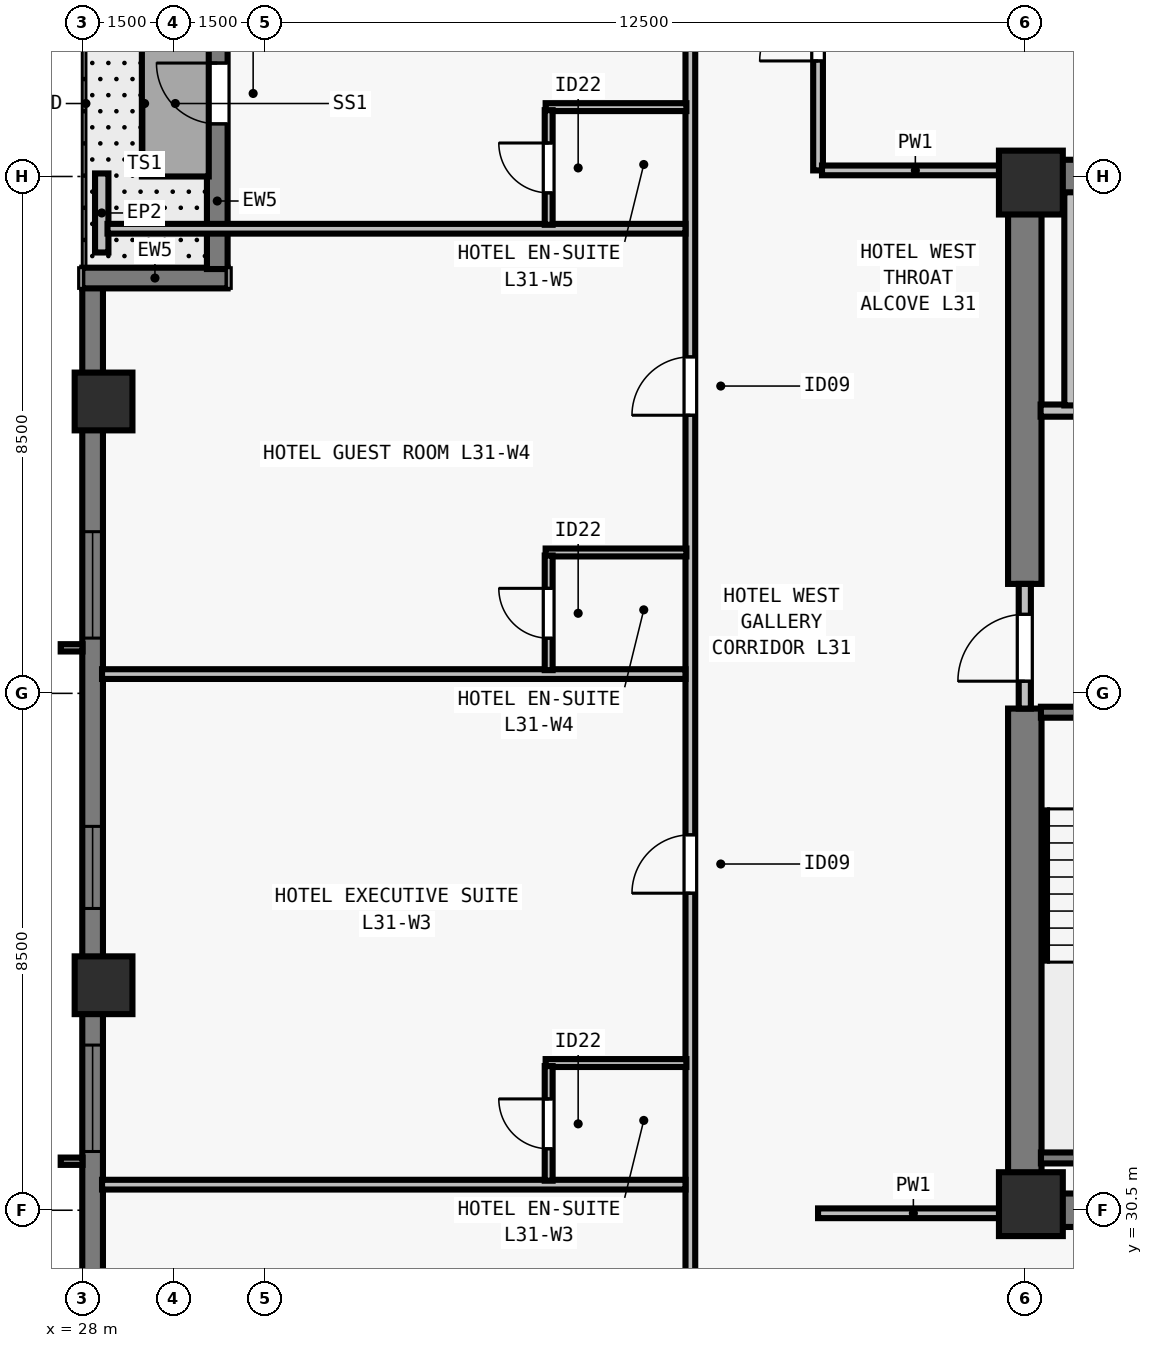
"""IFC4 building model, lengths in metres.
Left out: names, types, materials, properties, quantities, classifications, styles, units other than length and angle.
Written with IfcOpenShell. Run it as: python <this file> out.ifc"""

import sys

from ifc_helpers import new_model, si_unit, direction, frame, frame_2d, origin, origin_2d, place, context, subcontext, project, spatial, rectangle, extrude, element, fill, save


model = new_model("IFC4")
c1 = context("Model", 3, precision=1e-05, world=origin(), true_north=direction((0.0, 1.0)))
c2 = subcontext(c1, "Body", "Model", "MODEL_VIEW")
j1 = project(units=[si_unit("LENGTHUNIT", "METRE"), si_unit("PLANEANGLEUNIT", "RADIAN")], contexts=[c1])
p1 = place(None, origin())
s1 = spatial("IfcSite", under=j1, at=p1, CompositionType="ELEMENT")
p2 = place(p1, origin())
s2 = spatial("IfcBuilding", under=s1, at=p2, CompositionType="ELEMENT")
p3 = place(p2, frame((0.0, 0.0, 116.5)))
s3 = spatial("IfcBuildingStorey", under=s2, at=p3, CompositionType="ELEMENT", Elevation=116.5)
for number, where, z_axis, x_axis in (
    (1, (43.6, 30.6, 0.0), (0.0, 0.0, 1.0), (1.0, 0.0, 0.0)),
    (2, (43.6, 47.4, 0.0), (0.0, 0.0, 1.0), (1.0, 0.0, 0.0)),
):
    element("IfcColumn", number, at=place(p3, frame(where, z_axis=z_axis, x_axis=x_axis)), inside=s3, PredefinedType="COLUMN", context=c2, shape_type="SweptSolid", body=[
        extrude(rectangle(XDim=1.05, YDim=1.05, at=origin_2d()), origin(), (0.0, 0.0, 1.0), 3.5),
    ])
for number, where, z_axis, x_axis in (
    (3, (28.35, 43.8, 0.0), (0.0, 0.0, 1.0), (0.0, 1.0, 0.0)),
    (4, (28.35, 34.2, 0.0), (0.0, 0.0, 1.0), (0.0, 1.0, 0.0)),
):
    element("IfcColumn", number, at=place(p3, frame(where, z_axis=z_axis, x_axis=x_axis)), inside=s3, PredefinedType="COLUMN", context=c2, shape_type="SweptSolid", body=[
        extrude(rectangle(XDim=0.95, YDim=0.95, at=origin_2d()), origin(), (0.0, 0.0, 1.0), 3.5),
    ])
p4 = place(p3, frame((28.17, 19.0, 0.0), z_axis=(0.0, 0.0, 1.0), x_axis=(0.0, 1.0, 0.0)))
e5 = element("IfcWall", 5, at=p4, inside=s3, PredefinedType="SOLIDWALL", context=c2, shape_type="SweptSolid", body=[
    extrude(rectangle(XDim=26.682, YDim=0.34, at=frame_2d((13.341, 0.0))), origin(), (0.0, 0.0, 1.0), 3.28),
])
p5 = place(p4, frame((5.323, 0.0, 0.8)))
e6 = element("IfcOpeningElement", 6, at=p5, cuts=e5, PredefinedType="OPENING", context=c2, shape_type="SweptSolid", body=[
    extrude(rectangle(XDim=1.75, YDim=1.66, at=frame_2d((0.875, 0.83))), frame((0.0, 0.18, 0.0), z_axis=(0.0, -1.0, 0.0), x_axis=(1.0, 0.0, 0.0)), (0.0, 0.0, 1.0), 0.36),
])
p6 = place(p4, frame((8.87, 0.0, 0.8)))
e7 = element("IfcOpeningElement", 7, at=p6, cuts=e5, PredefinedType="OPENING", context=c2, shape_type="SweptSolid", body=[
    extrude(rectangle(XDim=1.35, YDim=1.66, at=frame_2d((0.675, 0.83))), frame((0.0, 0.18, 0.0), z_axis=(0.0, -1.0, 0.0), x_axis=(1.0, 0.0, 0.0)), (0.0, 0.0, 1.0), 0.36),
])
p7 = place(p4, frame((12.466, 0.0, 0.8)))
e8 = element("IfcOpeningElement", 8, at=p7, cuts=e5, PredefinedType="OPENING", context=c2, shape_type="SweptSolid", body=[
    extrude(rectangle(XDim=1.75, YDim=1.66, at=frame_2d((0.875, 0.83))), frame((0.0, 0.18, 0.0), z_axis=(0.0, -1.0, 0.0), x_axis=(1.0, 0.0, 0.0)), (0.0, 0.0, 1.0), 0.36),
])
p8 = place(p4, frame((16.462, 0.0, 0.8)))
e9 = element("IfcOpeningElement", 9, at=p8, cuts=e5, PredefinedType="OPENING", context=c2, shape_type="SweptSolid", body=[
    extrude(rectangle(XDim=1.35, YDim=1.66, at=frame_2d((0.675, 0.83))), frame((0.0, 0.18, 0.0), z_axis=(0.0, -1.0, 0.0), x_axis=(1.0, 0.0, 0.0)), (0.0, 0.0, 1.0), 0.36),
])
p9 = place(p4, frame((20.909, 0.0, 0.8)))
e10 = element("IfcOpeningElement", 10, at=p9, cuts=e5, PredefinedType="OPENING", context=c2, shape_type="SweptSolid", body=[
    extrude(rectangle(XDim=1.75, YDim=1.66, at=frame_2d((0.875, 0.83))), frame((0.0, 0.18, 0.0), z_axis=(0.0, -1.0, 0.0), x_axis=(1.0, 0.0, 0.0)), (0.0, 0.0, 1.0), 0.36),
])
p10 = place(p3, frame((28.0, 45.83, 0.0), z_axis=(0.0, 0.0, 1.0), x_axis=(1.0, 0.0, 0.0)))
e11 = element("IfcWall", 11, at=p10, inside=s3, PredefinedType="SOLIDWALL", context=c2, shape_type="SweptSolid", body=[
    extrude(rectangle(XDim=2.39, YDim=0.34, at=frame_2d((1.195, 0.0))), origin(), (0.0, 0.0, 1.0), 3.28),
])
p11 = place(p3, frame((30.22, 45.978, 0.0), z_axis=(0.0, 0.0, 1.0), x_axis=(0.0, 1.0, 0.0)))
e12 = element("IfcWall", 12, at=p11, inside=s3, PredefinedType="SOLIDWALL", context=c2, shape_type="SweptSolid", body=[
    extrude(rectangle(XDim=5.762, YDim=0.34, at=frame_2d((2.881, 0.0))), origin(), (0.0, 0.0, 1.0), 3.28),
])
p12 = place(p11, frame((2.387, 0.0, 0.0)))
e13 = element("IfcOpeningElement", 13, at=p12, cuts=e12, PredefinedType="OPENING", context=c2, shape_type="SweptSolid", body=[
    extrude(rectangle(XDim=1.0, YDim=2.15, at=frame_2d((0.5, 1.075))), frame((0.0, 0.18, 0.0), z_axis=(0.0, -1.0, 0.0), x_axis=(1.0, 0.0, 0.0)), (0.0, 0.0, 1.0), 0.36),
])
p13 = place(p3, frame((28.32, 46.25, 0.0), z_axis=(0.0, 0.0, 1.0), x_axis=(0.0, 1.0, 0.0)))
e14 = element("IfcWall", 14, at=p13, inside=s3, PredefinedType="PARAPET", context=c2, shape_type="SweptSolid", body=[
    extrude(rectangle(XDim=1.3, YDim=0.22, at=frame_2d((0.65, 0.0))), origin(), (0.0, 0.0, 1.0), 0.55),
])
for number, where, z_axis, x_axis in (
    (15, (43.225, 30.5, 0.0), (0.0, 0.0, 1.0), (1.0, 0.0, 0.0)),
    (16, (43.225, 47.5, 0.0), (0.0, 0.0, 1.0), (1.0, 0.0, 0.0)),
):
    element("IfcWall", number, at=place(p3, frame(where, z_axis=z_axis, x_axis=x_axis)), inside=s3, PredefinedType="SHEAR", context=c2, shape_type="SweptSolid", body=[
        extrude(rectangle(XDim=17.55, YDim=0.55, at=frame_2d((8.775, 0.0))), origin(), (0.0, 0.0, 1.0), 3.28),
    ])
p14 = place(p3, frame((43.5, 30.765, 0.0), z_axis=(0.0, 0.0, 1.0), x_axis=(0.0, 1.0, 0.0)))
e17 = element("IfcWall", 17, at=p14, inside=s3, PredefinedType="SHEAR", context=c2, shape_type="SweptSolid", body=[
    extrude(rectangle(XDim=7.985, YDim=0.55, at=frame_2d((3.993, 0.0))), origin(), (0.0, 0.0, 1.0), 3.28),
])
p15 = place(p3, frame((43.5, 40.8, 0.0), z_axis=(0.0, 0.0, 1.0), x_axis=(0.0, 1.0, 0.0)))
e18 = element("IfcWall", 18, at=p15, inside=s3, PredefinedType="SHEAR", context=c2, shape_type="SweptSolid", body=[
    extrude(rectangle(XDim=6.435, YDim=0.55, at=frame_2d((3.218, 0.0))), origin(), (0.0, 0.0, 1.0), 3.28),
])
p16 = place(p3, frame((43.5, 38.75, 0.0), z_axis=(0.0, 0.0, 1.0), x_axis=(0.0, 1.0, 0.0)))
e19 = element("IfcWall", 19, at=p16, inside=s3, PredefinedType="SOLIDWALL", context=c2, shape_type="SweptSolid", body=[
    extrude(rectangle(XDim=2.05, YDim=0.2, at=frame_2d((1.025, 0.0))), origin(), (0.0, 0.0, 1.0), 3.28),
])
p17 = place(p16, frame((0.45, 0.0, 0.0)))
e20 = element("IfcOpeningElement", 20, at=p17, cuts=e19, PredefinedType="OPENING", context=c2, shape_type="SweptSolid", body=[
    extrude(rectangle(XDim=1.1, YDim=2.15, at=frame_2d((0.55, 1.075))), frame((0.0, 0.11, 0.0), z_axis=(0.0, -1.0, 0.0), x_axis=(1.0, 0.0, 0.0)), (0.0, 0.0, 1.0), 0.22),
])
p18 = place(p3, frame((43.76, 43.65, 0.0), z_axis=(0.0, 0.0, 1.0), x_axis=(1.0, 0.0, 0.0)))
e21 = element("IfcWall", 21, at=p18, inside=s3, PredefinedType="SOLIDWALL", context=c2, shape_type="SweptSolid", body=[
    extrude(rectangle(XDim=3.505, YDim=0.2, at=frame_2d((1.752, 0.0))), origin(), (0.0, 0.0, 1.0), 3.28),
])
p19 = place(p18, frame((1.11, 0.0, 0.0)))
e22 = element("IfcOpeningElement", 22, at=p19, cuts=e21, PredefinedType="OPENING", context=c2, shape_type="SweptSolid", body=[
    extrude(rectangle(XDim=1.1, YDim=2.2, at=frame_2d((0.55, 1.1))), frame((0.0, 0.11, 0.0), z_axis=(0.0, -1.0, 0.0), x_axis=(1.0, 0.0, 0.0)), (0.0, 0.0, 1.0), 0.22),
])
p20 = place(p3, frame((44.25, 43.735, 0.0), z_axis=(0.0, 0.0, 1.0), x_axis=(0.0, 1.0, 0.0)))
e23 = element("IfcWall", 23, at=p20, inside=s3, PredefinedType="SOLIDWALL", context=c2, shape_type="SweptSolid", body=[
    extrude(rectangle(XDim=3.505, YDim=0.2, at=frame_2d((1.752, 0.0))), origin(), (0.0, 0.0, 1.0), 3.28),
])
p21 = place(p3, frame((38.0, 15.325, 0.0), z_axis=(0.0, 0.0, 1.0), x_axis=(0.0, 1.0, 0.0)))
e24 = element("IfcWall", 24, at=p21, inside=s3, PredefinedType="PARTITIONING", context=c2, shape_type="SweptSolid", body=[
    extrude(rectangle(XDim=47.35, YDim=0.16, at=frame_2d((23.675, 0.0))), origin(), (0.0, 0.0, 1.0), 2.555),
])
p22 = place(p21, frame((5.003, 0.0, 0.0)))
e25 = element("IfcOpeningElement", 25, at=p22, cuts=e24, PredefinedType="OPENING", context=c2, shape_type="SweptSolid", body=[
    extrude(rectangle(XDim=0.96, YDim=2.15, at=frame_2d((0.48, 1.075))), frame((0.0, 0.09, 0.0), z_axis=(0.0, -1.0, 0.0), x_axis=(1.0, 0.0, 0.0)), (0.0, 0.0, 1.0), 0.18),
])
p23 = place(p21, frame((12.529, 0.0, 0.0)))
e26 = element("IfcOpeningElement", 26, at=p23, cuts=e24, PredefinedType="OPENING", context=c2, shape_type="SweptSolid", body=[
    extrude(rectangle(XDim=0.96, YDim=2.15, at=frame_2d((0.48, 1.075))), frame((0.0, 0.09, 0.0), z_axis=(0.0, -1.0, 0.0), x_axis=(1.0, 0.0, 0.0)), (0.0, 0.0, 1.0), 0.18),
])
p24 = place(p21, frame((20.389, 0.0, 0.0)))
e27 = element("IfcOpeningElement", 27, at=p24, cuts=e24, PredefinedType="OPENING", context=c2, shape_type="SweptSolid", body=[
    extrude(rectangle(XDim=0.96, YDim=2.15, at=frame_2d((0.48, 1.075))), frame((0.0, 0.09, 0.0), z_axis=(0.0, -1.0, 0.0), x_axis=(1.0, 0.0, 0.0)), (0.0, 0.0, 1.0), 0.18),
])
p25 = place(p21, frame((28.249, 0.0, 0.0)))
e28 = element("IfcOpeningElement", 28, at=p25, cuts=e24, PredefinedType="OPENING", context=c2, shape_type="SweptSolid", body=[
    extrude(rectangle(XDim=0.96, YDim=2.15, at=frame_2d((0.48, 1.075))), frame((0.0, 0.09, 0.0), z_axis=(0.0, -1.0, 0.0), x_axis=(1.0, 0.0, 0.0)), (0.0, 0.0, 1.0), 0.18),
])
p26 = place(p21, frame((36.109, 0.0, 0.0)))
e29 = element("IfcOpeningElement", 29, at=p26, cuts=e24, PredefinedType="OPENING", context=c2, shape_type="SweptSolid", body=[
    extrude(rectangle(XDim=0.96, YDim=2.15, at=frame_2d((0.48, 1.075))), frame((0.0, 0.09, 0.0), z_axis=(0.0, -1.0, 0.0), x_axis=(1.0, 0.0, 0.0)), (0.0, 0.0, 1.0), 0.18),
])
p27 = place(p21, frame((44.079, 0.0, 0.0)))
e30 = element("IfcOpeningElement", 30, at=p27, cuts=e24, PredefinedType="OPENING", context=c2, shape_type="SweptSolid", body=[
    extrude(rectangle(XDim=0.96, YDim=2.15, at=frame_2d((0.48, 1.075))), frame((0.0, 0.09, 0.0), z_axis=(0.0, -1.0, 0.0), x_axis=(1.0, 0.0, 0.0)), (0.0, 0.0, 1.0), 0.18),
])
p28 = place(p3, frame((40.1, 47.6, 0.0), z_axis=(0.0, 0.0, 1.0), x_axis=(0.0, 1.0, 0.0)))
e31 = element("IfcWall", 31, at=p28, inside=s3, PredefinedType="PARTITIONING", context=c2, shape_type="SweptSolid", body=[
    extrude(rectangle(XDim=15.075, YDim=0.16, at=frame_2d((7.538, 0.0))), origin(), (0.0, 0.0, 1.0), 2.555),
])
p29 = place(p28, frame((1.8, 0.0, 0.0)))
e32 = element("IfcOpeningElement", 32, at=p29, cuts=e31, PredefinedType="OPENING", context=c2, shape_type="SweptSolid", body=[
    extrude(rectangle(XDim=0.96, YDim=2.12, at=frame_2d((0.48, 1.06))), frame((0.0, 0.09, 0.0), z_axis=(0.0, -1.0, 0.0), x_axis=(1.0, 0.0, 0.0)), (0.0, 0.0, 1.0), 0.18),
])
p30 = place(p3, frame((40.1, 30.45, 0.0), z_axis=(0.0, 0.0, 1.0), x_axis=(1.0, 0.0, 0.0)))
e33 = element("IfcWall", 33, at=p30, inside=s3, PredefinedType="PARTITIONING", context=c2, shape_type="SweptSolid", body=[
    extrude(rectangle(XDim=3.135, YDim=0.16, at=frame_2d((1.567, 0.0))), origin(), (0.0, 0.0, 1.0), 3.28),
])
p31 = place(p3, frame((40.165, 47.6, 0.0), z_axis=(0.0, 0.0, 1.0), x_axis=(1.0, 0.0, 0.0)))
e34 = element("IfcWall", 34, at=p31, inside=s3, PredefinedType="PARTITIONING", context=c2, shape_type="SweptSolid", body=[
    extrude(rectangle(XDim=3.07, YDim=0.16, at=frame_2d((1.535, 0.0))), origin(), (0.0, 0.0, 1.0), 3.28),
])
p32 = place(p3, frame((28.325, 30.921, 0.0), z_axis=(0.0, 0.0, 1.0), x_axis=(1.0, 0.0, 0.0)))
e35 = element("IfcWall", 35, at=p32, inside=s3, PredefinedType="PARTITIONING", context=c2, shape_type="SweptSolid", body=[
    extrude(rectangle(XDim=9.595, YDim=0.16, at=frame_2d((4.797, 0.0))), origin(), (0.0, 0.0, 1.0), 3.28),
])
p33 = place(p3, frame((35.62, 32.921, 0.0), z_axis=(0.0, 0.0, 1.0), x_axis=(1.0, 0.0, 0.0)))
e36 = element("IfcWall", 36, at=p33, inside=s3, PredefinedType="PLUMBINGWALL", context=c2, shape_type="SweptSolid", body=[
    extrude(rectangle(XDim=2.315, YDim=0.13, at=frame_2d((1.157, 0.0))), origin(), (0.0, 0.0, 1.0), 3.28),
])
p34 = place(p3, frame((35.67, 30.986, 0.0), z_axis=(0.0, 0.0, 1.0), x_axis=(0.0, 1.0, 0.0)))
e37 = element("IfcWall", 37, at=p34, inside=s3, PredefinedType="PLUMBINGWALL", context=c2, shape_type="SweptSolid", body=[
    extrude(rectangle(XDim=1.885, YDim=0.13, at=frame_2d((0.942, 0.0))), origin(), (0.0, 0.0, 1.0), 3.28),
])
p35 = place(p34, frame((0.525, 0.0, 0.0)))
e38 = element("IfcOpeningElement", 38, at=p35, cuts=e37, PredefinedType="OPENING", context=c2, shape_type="SweptSolid", body=[
    extrude(rectangle(XDim=0.82, YDim=2.1, at=frame_2d((0.41, 1.05))), frame((0.0, 0.075, 0.0), z_axis=(0.0, -1.0, 0.0), x_axis=(1.0, 0.0, 0.0)), (0.0, 0.0, 1.0), 0.15),
])
p36 = place(p3, frame((28.325, 39.317, 0.0), z_axis=(0.0, 0.0, 1.0), x_axis=(1.0, 0.0, 0.0)))
e39 = element("IfcWall", 39, at=p36, inside=s3, PredefinedType="PARTITIONING", context=c2, shape_type="SweptSolid", body=[
    extrude(rectangle(XDim=9.595, YDim=0.16, at=frame_2d((4.797, 0.0))), origin(), (0.0, 0.0, 1.0), 2.896),
])
p37 = place(p3, frame((35.62, 41.317, 0.0), z_axis=(0.0, 0.0, 1.0), x_axis=(1.0, 0.0, 0.0)))
e40 = element("IfcWall", 40, at=p37, inside=s3, PredefinedType="PLUMBINGWALL", context=c2, shape_type="SweptSolid", body=[
    extrude(rectangle(XDim=2.315, YDim=0.13, at=frame_2d((1.157, 0.0))), origin(), (0.0, 0.0, 1.0), 2.896),
])
p38 = place(p3, frame((35.67, 39.382, 0.0), z_axis=(0.0, 0.0, 1.0), x_axis=(0.0, 1.0, 0.0)))
e41 = element("IfcWall", 41, at=p38, inside=s3, PredefinedType="PLUMBINGWALL", context=c2, shape_type="SweptSolid", body=[
    extrude(rectangle(XDim=1.885, YDim=0.13, at=frame_2d((0.942, 0.0))), origin(), (0.0, 0.0, 1.0), 3.28),
])
p39 = place(p38, frame((0.525, 0.0, 0.0)))
e42 = element("IfcOpeningElement", 42, at=p39, cuts=e41, PredefinedType="OPENING", context=c2, shape_type="SweptSolid", body=[
    extrude(rectangle(XDim=0.82, YDim=2.1, at=frame_2d((0.41, 1.05))), frame((0.0, 0.075, 0.0), z_axis=(0.0, -1.0, 0.0), x_axis=(1.0, 0.0, 0.0)), (0.0, 0.0, 1.0), 0.15),
])
p40 = place(p3, frame((28.415, 46.641, 0.0), z_axis=(0.0, 0.0, 1.0), x_axis=(1.0, 0.0, 0.0)))
e43 = element("IfcWall", 43, at=p40, inside=s3, PredefinedType="PARTITIONING", context=c2, shape_type="SweptSolid", body=[
    extrude(rectangle(XDim=9.505, YDim=0.16, at=frame_2d((4.752, 0.0))), origin(), (0.0, 0.0, 1.0), 3.28),
])
p41 = place(p3, frame((35.62, 48.641, 0.0), z_axis=(0.0, 0.0, 1.0), x_axis=(1.0, 0.0, 0.0)))
e44 = element("IfcWall", 44, at=p41, inside=s3, PredefinedType="PLUMBINGWALL", context=c2, shape_type="SweptSolid", body=[
    extrude(rectangle(XDim=2.315, YDim=0.13, at=frame_2d((1.157, 0.0))), origin(), (0.0, 0.0, 1.0), 3.28),
])
p42 = place(p3, frame((35.67, 46.706, 0.0), z_axis=(0.0, 0.0, 1.0), x_axis=(0.0, 1.0, 0.0)))
e45 = element("IfcWall", 45, at=p42, inside=s3, PredefinedType="PLUMBINGWALL", context=c2, shape_type="SweptSolid", body=[
    extrude(rectangle(XDim=1.885, YDim=0.13, at=frame_2d((0.942, 0.0))), origin(), (0.0, 0.0, 1.0), 3.28),
])
p43 = place(p42, frame((0.525, 0.0, 0.0)))
e46 = element("IfcOpeningElement", 46, at=p43, cuts=e45, PredefinedType="OPENING", context=c2, shape_type="SweptSolid", body=[
    extrude(rectangle(XDim=0.82, YDim=2.1, at=frame_2d((0.41, 1.05))), frame((0.0, 0.075, 0.0), z_axis=(0.0, -1.0, 0.0), x_axis=(1.0, 0.0, 0.0)), (0.0, 0.0, 1.0), 0.15),
])
p44 = place(p3, frame((43.765, 38.69, 0.0), z_axis=(0.0, 0.0, 1.0), x_axis=(1.0, 0.0, 0.0)))
e47 = element("IfcWall", 47, at=p44, inside=s3, PredefinedType="SOLIDWALL", context=c2, shape_type="SweptSolid", body=[
    extrude(rectangle(XDim=3.23, YDim=0.18, at=frame_2d((1.615, 0.0))), origin(), (0.0, 0.0, 1.0), 3.28),
])
p45 = place(p44, frame((1.14, 0.0, 0.0)))
e48 = element("IfcOpeningElement", 48, at=p45, cuts=e47, PredefinedType="OPENING", context=c2, shape_type="SweptSolid", body=[
    extrude(rectangle(XDim=0.95, YDim=2.15, at=frame_2d((0.475, 1.075))), frame((0.0, 0.1, 0.0), z_axis=(0.0, -1.0, 0.0), x_axis=(1.0, 0.0, 0.0)), (0.0, 0.0, 1.0), 0.2),
])
p46 = place(p3, frame((43.765, 31.36, 0.0), z_axis=(0.0, 0.0, 1.0), x_axis=(1.0, 0.0, 0.0)))
e49 = element("IfcWall", 49, at=p46, inside=s3, PredefinedType="SOLIDWALL", context=c2, shape_type="SweptSolid", body=[
    extrude(rectangle(XDim=3.23, YDim=0.18, at=frame_2d((1.615, 0.0))), origin(), (0.0, 0.0, 1.0), 3.28),
])
p47 = place(p7, origin())
e50 = element("IfcWindow", 50, at=p47, inside=s3, PartitioningType="SINGLE_PANEL", PredefinedType="WINDOW", context=c2, shape_type="SweptSolid", body=[
    extrude(rectangle(XDim=1.75, YDim=1.66, at=frame_2d((0.875, 0.83))), frame((0.0, -0.05, 0.0), z_axis=(0.0, -1.0, 0.0), x_axis=(1.0, 0.0, 0.0)), (0.0, 0.0, 1.0), 0.06),
])
fill(e8, e50)
p48 = place(p8, origin())
e51 = element("IfcWindow", 51, at=p48, inside=s3, PartitioningType="SINGLE_PANEL", PredefinedType="WINDOW", context=c2, shape_type="SweptSolid", body=[
    extrude(rectangle(XDim=1.35, YDim=1.66, at=frame_2d((0.675, 0.83))), frame((0.0, -0.05, 0.0), z_axis=(0.0, -1.0, 0.0), x_axis=(1.0, 0.0, 0.0)), (0.0, 0.0, 1.0), 0.06),
])
fill(e9, e51)
p49 = place(p9, origin())
e52 = element("IfcWindow", 52, at=p49, inside=s3, PartitioningType="SINGLE_PANEL", PredefinedType="WINDOW", context=c2, shape_type="SweptSolid", body=[
    extrude(rectangle(XDim=1.75, YDim=1.66, at=frame_2d((0.875, 0.83))), frame((0.0, -0.05, 0.0), z_axis=(0.0, -1.0, 0.0), x_axis=(1.0, 0.0, 0.0)), (0.0, 0.0, 1.0), 0.06),
])
fill(e10, e52)
p50 = place(p12, origin())
e53 = element("IfcDoor", 53, at=p50, inside=s3, OperationType="SINGLE_SWING_RIGHT", PredefinedType="DOOR", context=c2, shape_type="SweptSolid", body=[
    extrude(rectangle(XDim=1.0, YDim=2.15, at=frame_2d((0.5, 1.075))), frame((0.0, 0.025, 0.0), z_axis=(0.0, -1.0, 0.0), x_axis=(1.0, 0.0, 0.0)), (0.0, 0.0, 1.0), 0.05),
])
fill(e13, e53)
p51 = place(p17, origin())
e54 = element("IfcDoor", 54, at=p51, inside=s3, OperationType="SINGLE_SWING_LEFT", PredefinedType="DOOR", context=c2, shape_type="SweptSolid", body=[
    extrude(rectangle(XDim=1.1, YDim=2.15, at=frame_2d((0.55, 1.075))), frame((0.0, 0.025, 0.0), z_axis=(0.0, -1.0, 0.0), x_axis=(1.0, 0.0, 0.0)), (0.0, 0.0, 1.0), 0.05),
])
fill(e20, e54)
p52 = place(p29, origin())
e55 = element("IfcDoor", 55, at=p52, inside=s3, OperationType="SINGLE_SWING_LEFT", PredefinedType="DOOR", context=c2, shape_type="SweptSolid", body=[
    extrude(rectangle(XDim=0.96, YDim=2.12, at=frame_2d((0.48, 1.06))), frame((0.0, 0.025, 0.0), z_axis=(0.0, -1.0, 0.0), x_axis=(1.0, 0.0, 0.0)), (0.0, 0.0, 1.0), 0.05),
])
fill(e32, e55)
p53 = place(p35, origin())
e56 = element("IfcDoor", 56, at=p53, inside=s3, OperationType="SINGLE_SWING_RIGHT", PredefinedType="DOOR", context=c2, shape_type="SweptSolid", body=[
    extrude(rectangle(XDim=0.82, YDim=2.1, at=frame_2d((0.41, 1.05))), frame((0.0, 0.025, 0.0), z_axis=(0.0, -1.0, 0.0), x_axis=(1.0, 0.0, 0.0)), (0.0, 0.0, 1.0), 0.05),
])
fill(e38, e56)
p54 = place(p24, origin())
e57 = element("IfcDoor", 57, at=p54, inside=s3, OperationType="SINGLE_SWING_LEFT", PredefinedType="DOOR", context=c2, shape_type="SweptSolid", body=[
    extrude(rectangle(XDim=0.96, YDim=2.15, at=frame_2d((0.48, 1.075))), frame((0.0, 0.025, 0.0), z_axis=(0.0, -1.0, 0.0), x_axis=(1.0, 0.0, 0.0)), (0.0, 0.0, 1.0), 0.05),
])
fill(e27, e57)
p55 = place(p39, origin())
e58 = element("IfcDoor", 58, at=p55, inside=s3, OperationType="SINGLE_SWING_RIGHT", PredefinedType="DOOR", context=c2, shape_type="SweptSolid", body=[
    extrude(rectangle(XDim=0.82, YDim=2.1, at=frame_2d((0.41, 1.05))), frame((0.0, 0.025, 0.0), z_axis=(0.0, -1.0, 0.0), x_axis=(1.0, 0.0, 0.0)), (0.0, 0.0, 1.0), 0.05),
])
fill(e42, e58)
p56 = place(p25, origin())
e59 = element("IfcDoor", 59, at=p56, inside=s3, OperationType="SINGLE_SWING_LEFT", PredefinedType="DOOR", context=c2, shape_type="SweptSolid", body=[
    extrude(rectangle(XDim=0.96, YDim=2.15, at=frame_2d((0.48, 1.075))), frame((0.0, 0.025, 0.0), z_axis=(0.0, -1.0, 0.0), x_axis=(1.0, 0.0, 0.0)), (0.0, 0.0, 1.0), 0.05),
])
fill(e28, e59)
p57 = place(p43, origin())
e60 = element("IfcDoor", 60, at=p57, inside=s3, OperationType="SINGLE_SWING_RIGHT", PredefinedType="DOOR", context=c2, shape_type="SweptSolid", body=[
    extrude(rectangle(XDim=0.82, YDim=2.1, at=frame_2d((0.41, 1.05))), frame((0.0, 0.025, 0.0), z_axis=(0.0, -1.0, 0.0), x_axis=(1.0, 0.0, 0.0)), (0.0, 0.0, 1.0), 0.05),
])
fill(e46, e60)
save(model, sys.argv[1])
